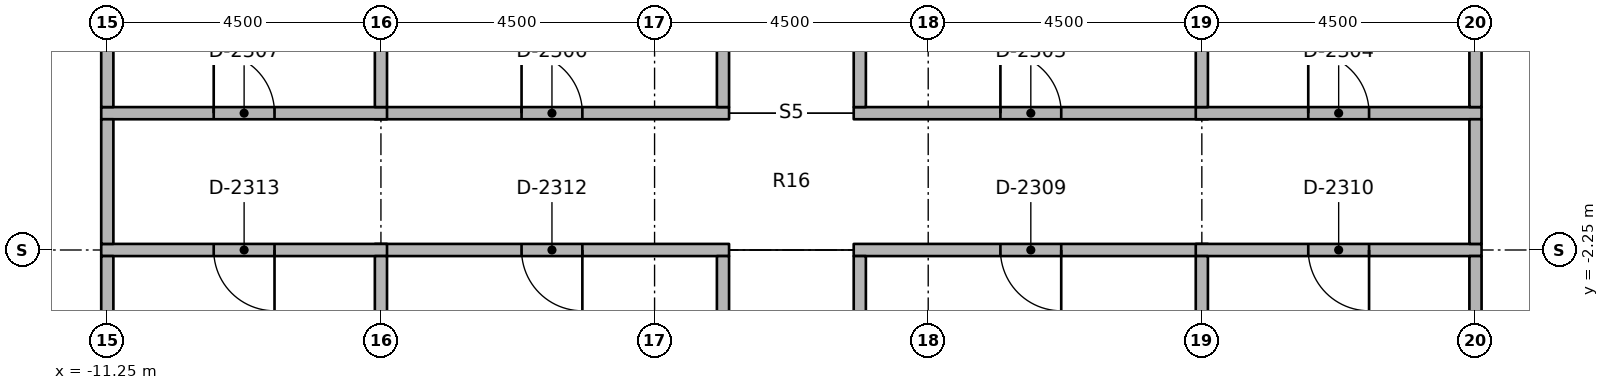
"""IFC4 building model, lengths in metres.
Left out: names, types, materials, properties, quantities, classifications, styles, units other than length and angle.
Written with IfcOpenShell. Run it as: python <this file> out.ifc"""

import sys

from ifc_helpers import new_model, si_unit, direction, frame, frame_2d, origin, place, context, subcontext, project, spatial, rectangle, extrude, element, fill, save


model = new_model("IFC4")
c1 = context("Model", 3, precision=1e-05, world=origin(), true_north=direction((0.0, 1.0)))
c2 = subcontext(c1, "Body", "Model", "MODEL_VIEW")
j1 = project(units=[si_unit("LENGTHUNIT", "METRE"), si_unit("PLANEANGLEUNIT", "RADIAN")], contexts=[c1])
p1 = place(None, origin())
s1 = spatial("IfcSite", under=j1, at=p1, CompositionType="ELEMENT")
p2 = place(p1, origin())
s2 = spatial("IfcBuilding", under=s1, at=p2, CompositionType="ELEMENT")
p3 = place(p2, frame((0.0, 0.0, 218.2)))
s3 = spatial("IfcBuildingStorey", under=s2, at=p3, CompositionType="ELEMENT", Elevation=218.2)
p4 = place(p3, frame((1.025, 0.0, 0.0), z_axis=(0.0, 0.0, 1.0), x_axis=(1.0, 0.0, 0.0)))
e1 = element("IfcWall", 1, at=p4, inside=s3, PredefinedType="PARTITIONING", context=c2, shape_type="SweptSolid", body=[
    extrude(rectangle(XDim=5.825, YDim=0.2, at=frame_2d((2.913, 0.0))), origin(), (0.0, 0.0, 1.0), 2.75),
])
p5 = place(p4, frame((2.413, 0.0, 0.0)))
e2 = element("IfcOpeningElement", 2, at=p5, cuts=e1, PredefinedType="OPENING", context=c2, shape_type="SweptSolid", body=[
    extrude(rectangle(XDim=1.0, YDim=2.1, at=frame_2d((0.5, 1.05))), frame((0.0, 0.11, 0.0), z_axis=(0.0, -1.0, 0.0), x_axis=(1.0, 0.0, 0.0)), (0.0, 0.0, 1.0), 0.22),
])
p6 = place(p3, frame((6.65, 0.0, 0.0), z_axis=(0.0, 0.0, 1.0), x_axis=(1.0, 0.0, 0.0)))
e3 = element("IfcWall", 3, at=p6, inside=s3, PredefinedType="PARTITIONING", context=c2, shape_type="SweptSolid", body=[
    extrude(rectangle(XDim=4.7, YDim=0.2, at=frame_2d((2.35, 0.0))), origin(), (0.0, 0.0, 1.0), 2.75),
])
p7 = place(p6, frame((1.85, 0.0, 0.0)))
e4 = element("IfcOpeningElement", 4, at=p7, cuts=e3, PredefinedType="OPENING", context=c2, shape_type="SweptSolid", body=[
    extrude(rectangle(XDim=1.0, YDim=2.1, at=frame_2d((0.5, 1.05))), frame((0.0, 0.11, 0.0), z_axis=(0.0, -1.0, 0.0), x_axis=(1.0, 0.0, 0.0)), (0.0, 0.0, 1.0), 0.22),
])
p8 = place(p3, frame((-6.85, 0.0, 0.0), z_axis=(0.0, 0.0, 1.0), x_axis=(1.0, 0.0, 0.0)))
e5 = element("IfcWall", 5, at=p8, inside=s3, PredefinedType="PARTITIONING", context=c2, shape_type="SweptSolid", body=[
    extrude(rectangle(XDim=5.825, YDim=0.2, at=frame_2d((2.913, 0.0))), origin(), (0.0, 0.0, 1.0), 2.75),
])
p9 = place(p8, frame((2.413, 0.0, 0.0)))
e6 = element("IfcOpeningElement", 6, at=p9, cuts=e5, PredefinedType="OPENING", context=c2, shape_type="SweptSolid", body=[
    extrude(rectangle(XDim=1.0, YDim=2.1, at=frame_2d((0.5, 1.05))), frame((0.0, 0.11, 0.0), z_axis=(0.0, -1.0, 0.0), x_axis=(1.0, 0.0, 0.0)), (0.0, 0.0, 1.0), 0.22),
])
p10 = place(p3, frame((-11.35, 0.0, 0.0), z_axis=(0.0, 0.0, 1.0), x_axis=(1.0, 0.0, 0.0)))
e7 = element("IfcWall", 7, at=p10, inside=s3, PredefinedType="PARTITIONING", context=c2, shape_type="SweptSolid", body=[
    extrude(rectangle(XDim=4.7, YDim=0.2, at=frame_2d((2.35, 0.0))), origin(), (0.0, 0.0, 1.0), 2.75),
])
p11 = place(p10, frame((1.85, 0.0, 0.0)))
e8 = element("IfcOpeningElement", 8, at=p11, cuts=e7, PredefinedType="OPENING", context=c2, shape_type="SweptSolid", body=[
    extrude(rectangle(XDim=1.0, YDim=2.1, at=frame_2d((0.5, 1.05))), frame((0.0, 0.11, 0.0), z_axis=(0.0, -1.0, 0.0), x_axis=(1.0, 0.0, 0.0)), (0.0, 0.0, 1.0), 0.22),
])
p12 = place(p3, frame((6.85, -2.25, 0.0), z_axis=(0.0, 0.0, 1.0), x_axis=(-1.0, 0.0, 0.0)))
e9 = element("IfcWall", 9, at=p12, inside=s3, PredefinedType="PARTITIONING", context=c2, shape_type="SweptSolid", body=[
    extrude(rectangle(XDim=5.825, YDim=0.2, at=frame_2d((2.913, 0.0))), origin(), (0.0, 0.0, 1.0), 2.75),
])
p13 = place(p12, frame((2.413, 0.0, 0.0)))
e10 = element("IfcOpeningElement", 10, at=p13, cuts=e9, PredefinedType="OPENING", context=c2, shape_type="SweptSolid", body=[
    extrude(rectangle(XDim=1.0, YDim=2.1, at=frame_2d((0.5, 1.05))), frame((0.0, 0.11, 0.0), z_axis=(0.0, -1.0, 0.0), x_axis=(1.0, 0.0, 0.0)), (0.0, 0.0, 1.0), 0.22),
])
p14 = place(p3, frame((11.35, -2.25, 0.0), z_axis=(0.0, 0.0, 1.0), x_axis=(-1.0, 0.0, 0.0)))
e11 = element("IfcWall", 11, at=p14, inside=s3, PredefinedType="PARTITIONING", context=c2, shape_type="SweptSolid", body=[
    extrude(rectangle(XDim=4.7, YDim=0.2, at=frame_2d((2.35, 0.0))), origin(), (0.0, 0.0, 1.0), 2.75),
])
p15 = place(p14, frame((1.85, 0.0, 0.0)))
e12 = element("IfcOpeningElement", 12, at=p15, cuts=e11, PredefinedType="OPENING", context=c2, shape_type="SweptSolid", body=[
    extrude(rectangle(XDim=1.0, YDim=2.1, at=frame_2d((0.5, 1.05))), frame((0.0, 0.11, 0.0), z_axis=(0.0, -1.0, 0.0), x_axis=(1.0, 0.0, 0.0)), (0.0, 0.0, 1.0), 0.22),
])
p16 = place(p3, frame((-1.025, -2.25, 0.0), z_axis=(0.0, 0.0, 1.0), x_axis=(-1.0, 0.0, 0.0)))
e13 = element("IfcWall", 13, at=p16, inside=s3, PredefinedType="PARTITIONING", context=c2, shape_type="SweptSolid", body=[
    extrude(rectangle(XDim=5.825, YDim=0.2, at=frame_2d((2.913, 0.0))), origin(), (0.0, 0.0, 1.0), 2.75),
])
p17 = place(p16, frame((2.413, 0.0, 0.0)))
e14 = element("IfcOpeningElement", 14, at=p17, cuts=e13, PredefinedType="OPENING", context=c2, shape_type="SweptSolid", body=[
    extrude(rectangle(XDim=1.0, YDim=2.1, at=frame_2d((0.5, 1.05))), frame((0.0, 0.11, 0.0), z_axis=(0.0, -1.0, 0.0), x_axis=(1.0, 0.0, 0.0)), (0.0, 0.0, 1.0), 0.22),
])
p18 = place(p3, frame((-6.65, -2.25, 0.0), z_axis=(0.0, 0.0, 1.0), x_axis=(-1.0, 0.0, 0.0)))
e15 = element("IfcWall", 15, at=p18, inside=s3, PredefinedType="PARTITIONING", context=c2, shape_type="SweptSolid", body=[
    extrude(rectangle(XDim=4.7, YDim=0.2, at=frame_2d((2.35, 0.0))), origin(), (0.0, 0.0, 1.0), 2.75),
])
p19 = place(p18, frame((1.85, 0.0, 0.0)))
e16 = element("IfcOpeningElement", 16, at=p19, cuts=e15, PredefinedType="OPENING", context=c2, shape_type="SweptSolid", body=[
    extrude(rectangle(XDim=1.0, YDim=2.1, at=frame_2d((0.5, 1.05))), frame((0.0, 0.11, 0.0), z_axis=(0.0, -1.0, 0.0), x_axis=(1.0, 0.0, 0.0)), (0.0, 0.0, 1.0), 0.22),
])
for number, where, z_axis, x_axis in (
    (17, (11.25, -2.15, 0.0), (0.0, 0.0, 1.0), (0.0, 1.0, 0.0)),
    (18, (-11.25, -2.15, 0.0), (0.0, 0.0, 1.0), (0.0, 1.0, 0.0)),
):
    element("IfcWall", number, at=place(p3, frame(where, z_axis=z_axis, x_axis=x_axis)), inside=s3, PredefinedType="PARTITIONING", context=c2, shape_type="SweptSolid", body=[
        extrude(rectangle(XDim=2.05, YDim=0.2, at=frame_2d((1.025, 0.0))), origin(), (0.0, 0.0, 1.0), 2.75),
    ])
for number, where, z_axis, x_axis in (
    (19, (1.125, 0.1, 0.0), (0.0, 0.0, 1.0), (0.0, 1.0, 0.0)),
    (20, (-1.125, 0.1, 0.0), (0.0, 0.0, 1.0), (0.0, 1.0, 0.0)),
):
    element("IfcWall", number, at=place(p3, frame(where, z_axis=z_axis, x_axis=x_axis)), inside=s3, PredefinedType="PARTITIONING", context=c2, shape_type="SweptSolid", body=[
        extrude(rectangle(XDim=6.55, YDim=0.2, at=frame_2d((3.275, 0.0))), origin(), (0.0, 0.0, 1.0), 2.75),
    ])
for number, where, z_axis, x_axis in (
    (21, (1.125, -6.65, 0.0), (0.0, 0.0, 1.0), (0.0, 1.0, 0.0)),
    (22, (-1.125, -6.65, 0.0), (0.0, 0.0, 1.0), (0.0, 1.0, 0.0)),
):
    element("IfcWall", number, at=place(p3, frame(where, z_axis=z_axis, x_axis=x_axis)), inside=s3, PredefinedType="PARTITIONING", context=c2, shape_type="SweptSolid", body=[
        extrude(rectangle(XDim=4.3, YDim=0.2, at=frame_2d((2.15, 0.0))), origin(), (0.0, 0.0, 1.0), 2.75),
    ])
p20 = place(p3, frame((6.75, 0.1, 0.0), z_axis=(0.0, 0.0, 1.0), x_axis=(0.0, 1.0, 0.0)))
e23 = element("IfcWall", 23, at=p20, inside=s3, PredefinedType="PARTITIONING", context=c2, shape_type="SweptSolid", body=[
    extrude(rectangle(XDim=6.55, YDim=0.2, at=frame_2d((3.275, 0.0))), origin(), (0.0, 0.0, 1.0), 2.75),
])
p21 = place(p3, frame((11.25, 6.65, 0.0), z_axis=(0.0, 0.0, 1.0), x_axis=(0.0, -1.0, 0.0)))
e24 = element("IfcWall", 24, at=p21, inside=s3, PredefinedType="PARTITIONING", context=c2, shape_type="SweptSolid", body=[
    extrude(rectangle(XDim=6.55, YDim=0.2, at=frame_2d((3.275, 0.0))), origin(), (0.0, 0.0, 1.0), 2.75),
])
p22 = place(p21, frame((2.375, 0.0, 0.0)))
e25 = element("IfcOpeningElement", 25, at=p22, cuts=e24, PredefinedType="OPENING", context=c2, shape_type="SweptSolid", body=[
    extrude(rectangle(XDim=1.8, YDim=2.1, at=frame_2d((0.9, 1.05))), frame((0.0, 0.11, 0.0), z_axis=(0.0, -1.0, 0.0), x_axis=(1.0, 0.0, 0.0)), (0.0, 0.0, 1.0), 0.22),
])
p23 = place(p3, frame((-6.75, 0.1, 0.0), z_axis=(0.0, 0.0, 1.0), x_axis=(0.0, 1.0, 0.0)))
e26 = element("IfcWall", 26, at=p23, inside=s3, PredefinedType="PARTITIONING", context=c2, shape_type="SweptSolid", body=[
    extrude(rectangle(XDim=6.55, YDim=0.2, at=frame_2d((3.275, 0.0))), origin(), (0.0, 0.0, 1.0), 2.75),
])
p24 = place(p3, frame((-11.25, 0.1, 0.0), z_axis=(0.0, 0.0, 1.0), x_axis=(0.0, 1.0, 0.0)))
e27 = element("IfcWall", 27, at=p24, inside=s3, PredefinedType="PARTITIONING", context=c2, shape_type="SweptSolid", body=[
    extrude(rectangle(XDim=6.55, YDim=0.2, at=frame_2d((3.275, 0.0))), origin(), (0.0, 0.0, 1.0), 2.75),
])
p25 = place(p24, frame((2.375, 0.0, 0.0)))
e28 = element("IfcOpeningElement", 28, at=p25, cuts=e27, PredefinedType="OPENING", context=c2, shape_type="SweptSolid", body=[
    extrude(rectangle(XDim=1.8, YDim=2.1, at=frame_2d((0.9, 1.05))), frame((0.0, 0.11, 0.0), z_axis=(0.0, -1.0, 0.0), x_axis=(1.0, 0.0, 0.0)), (0.0, 0.0, 1.0), 0.22),
])
for number, where, z_axis, x_axis in (
    (29, (6.75, -6.65, 0.0), (0.0, 0.0, 1.0), (0.0, 1.0, 0.0)),
    (30, (11.25, -6.65, 0.0), (0.0, 0.0, 1.0), (0.0, 1.0, 0.0)),
    (31, (-6.75, -6.65, 0.0), (0.0, 0.0, 1.0), (0.0, 1.0, 0.0)),
):
    element("IfcWall", number, at=place(p3, frame(where, z_axis=z_axis, x_axis=x_axis)), inside=s3, PredefinedType="PARTITIONING", context=c2, shape_type="SweptSolid", body=[
        extrude(rectangle(XDim=4.3, YDim=0.2, at=frame_2d((2.15, 0.0))), origin(), (0.0, 0.0, 1.0), 2.75),
    ])
p26 = place(p3, frame((-11.25, -6.17, 0.0), z_axis=(0.0, 0.0, 1.0), x_axis=(0.0, 1.0, 0.0)))
e32 = element("IfcWall", 32, at=p26, inside=s3, PredefinedType="PARTITIONING", context=c2, shape_type="SweptSolid", body=[
    extrude(rectangle(XDim=3.82, YDim=0.2, at=frame_2d((1.91, 0.0))), origin(), (0.0, 0.0, 1.0), 2.75),
])
p27 = place(p5, origin())
e33 = element("IfcDoor", 33, at=p27, inside=s3, OperationType="SINGLE_SWING_RIGHT", PredefinedType="DOOR", context=c2, shape_type="SweptSolid", body=[
    extrude(rectangle(XDim=1.0, YDim=2.1, at=frame_2d((0.5, 1.05))), frame((0.0, 0.025, 0.0), z_axis=(0.0, -1.0, 0.0), x_axis=(1.0, 0.0, 0.0)), (0.0, 0.0, 1.0), 0.05),
])
fill(e2, e33)
p28 = place(p7, origin())
e34 = element("IfcDoor", 34, at=p28, inside=s3, OperationType="SINGLE_SWING_RIGHT", PredefinedType="DOOR", context=c2, shape_type="SweptSolid", body=[
    extrude(rectangle(XDim=1.0, YDim=2.1, at=frame_2d((0.5, 1.05))), frame((0.0, 0.025, 0.0), z_axis=(0.0, -1.0, 0.0), x_axis=(1.0, 0.0, 0.0)), (0.0, 0.0, 1.0), 0.05),
])
fill(e4, e34)
p29 = place(p9, origin())
e35 = element("IfcDoor", 35, at=p29, inside=s3, OperationType="SINGLE_SWING_RIGHT", PredefinedType="DOOR", context=c2, shape_type="SweptSolid", body=[
    extrude(rectangle(XDim=1.0, YDim=2.1, at=frame_2d((0.5, 1.05))), frame((0.0, 0.025, 0.0), z_axis=(0.0, -1.0, 0.0), x_axis=(1.0, 0.0, 0.0)), (0.0, 0.0, 1.0), 0.05),
])
fill(e6, e35)
p30 = place(p11, origin())
e36 = element("IfcDoor", 36, at=p30, inside=s3, OperationType="SINGLE_SWING_RIGHT", PredefinedType="DOOR", context=c2, shape_type="SweptSolid", body=[
    extrude(rectangle(XDim=1.0, YDim=2.1, at=frame_2d((0.5, 1.05))), frame((0.0, 0.025, 0.0), z_axis=(0.0, -1.0, 0.0), x_axis=(1.0, 0.0, 0.0)), (0.0, 0.0, 1.0), 0.05),
])
fill(e8, e36)
p31 = place(p13, origin())
e37 = element("IfcDoor", 37, at=p31, inside=s3, OperationType="SINGLE_SWING_RIGHT", PredefinedType="DOOR", context=c2, shape_type="SweptSolid", body=[
    extrude(rectangle(XDim=1.0, YDim=2.1, at=frame_2d((0.5, 1.05))), frame((0.0, 0.025, 0.0), z_axis=(0.0, -1.0, 0.0), x_axis=(1.0, 0.0, 0.0)), (0.0, 0.0, 1.0), 0.05),
])
fill(e10, e37)
p32 = place(p15, origin())
e38 = element("IfcDoor", 38, at=p32, inside=s3, OperationType="SINGLE_SWING_RIGHT", PredefinedType="DOOR", context=c2, shape_type="SweptSolid", body=[
    extrude(rectangle(XDim=1.0, YDim=2.1, at=frame_2d((0.5, 1.05))), frame((0.0, 0.025, 0.0), z_axis=(0.0, -1.0, 0.0), x_axis=(1.0, 0.0, 0.0)), (0.0, 0.0, 1.0), 0.05),
])
fill(e12, e38)
p33 = place(p17, origin())
e39 = element("IfcDoor", 39, at=p33, inside=s3, OperationType="SINGLE_SWING_RIGHT", PredefinedType="DOOR", context=c2, shape_type="SweptSolid", body=[
    extrude(rectangle(XDim=1.0, YDim=2.1, at=frame_2d((0.5, 1.05))), frame((0.0, 0.025, 0.0), z_axis=(0.0, -1.0, 0.0), x_axis=(1.0, 0.0, 0.0)), (0.0, 0.0, 1.0), 0.05),
])
fill(e14, e39)
p34 = place(p19, origin())
e40 = element("IfcDoor", 40, at=p34, inside=s3, OperationType="SINGLE_SWING_RIGHT", PredefinedType="DOOR", context=c2, shape_type="SweptSolid", body=[
    extrude(rectangle(XDim=1.0, YDim=2.1, at=frame_2d((0.5, 1.05))), frame((0.0, 0.025, 0.0), z_axis=(0.0, -1.0, 0.0), x_axis=(1.0, 0.0, 0.0)), (0.0, 0.0, 1.0), 0.05),
])
fill(e16, e40)
save(model, sys.argv[1])
